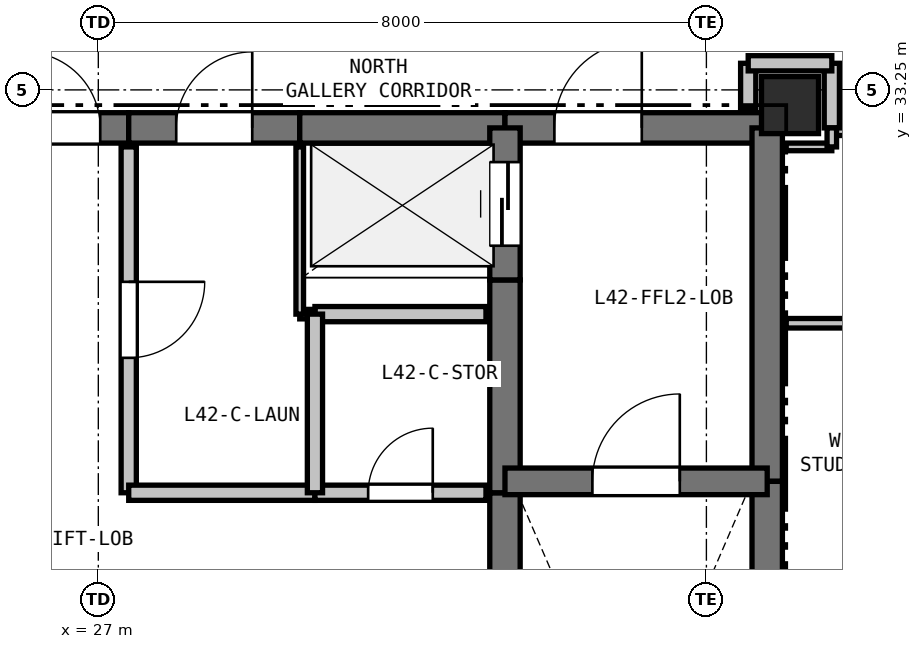
"""IFC4 building model, lengths in metres.
Left out: names, types, materials, properties, quantities, classifications, styles, units other than length and angle.
Written with IfcOpenShell. Run it as: python <this file> out.ifc"""

import sys

from ifc_helpers import new_model, si_unit, direction, frame, frame_2d, origin, origin_2d, place, context, subcontext, project, spatial, rectangle, extrude, element, fill, save


model = new_model("IFC4")
c1 = context("Model", 3, precision=1e-05, world=origin(), true_north=direction((0.0, 1.0)))
c2 = subcontext(c1, "Body", "Model", "MODEL_VIEW")
j1 = project(units=[si_unit("LENGTHUNIT", "METRE"), si_unit("PLANEANGLEUNIT", "RADIAN")], contexts=[c1])
p1 = place(None, origin())
s1 = spatial("IfcSite", under=j1, at=p1, CompositionType="ELEMENT")
p2 = place(p1, origin())
s2 = spatial("IfcBuilding", under=s1, at=p2, CompositionType="ELEMENT")
p3 = place(p2, frame((0.0, 0.0, 150.9)))
s3 = spatial("IfcBuildingStorey", under=s2, at=p3, CompositionType="ELEMENT", Elevation=150.9)
p4 = place(p3, frame((36.1, 33.05, 0.0), z_axis=(0.0, 0.0, 1.0), x_axis=(1.0, 0.0, 0.0)))
e1 = element("IfcColumn", 1, at=p4, inside=s3, PredefinedType="COLUMN", context=c2, shape_type="SweptSolid", body=[
    extrude(rectangle(XDim=0.75, YDim=0.75, at=origin_2d()), origin(), (0.0, 0.0, 1.0), 3.3),
])
p5 = place(p3, frame((25.65, 32.75, 0.0), z_axis=(0.0, 0.0, 1.0), x_axis=(1.0, 0.0, 0.0)))
e2 = element("IfcWall", 2, at=p5, inside=s3, PredefinedType="SHEAR", context=c2, shape_type="SweptSolid", body=[
    extrude(rectangle(XDim=1.75, YDim=0.4, at=frame_2d((0.875, 0.0))), origin(), (0.0, 0.0, 1.0), 3.06),
])
p6 = place(p5, frame((0.375, 0.0, 0.0)))
e3 = element("IfcOpeningElement", 3, at=p6, cuts=e2, PredefinedType="OPENING", context=c2, shape_type="SweptSolid", body=[
    extrude(rectangle(XDim=1.0, YDim=2.15, at=frame_2d((0.5, 1.075))), frame((0.0, 0.21, 0.0), z_axis=(0.0, -1.0, 0.0), x_axis=(1.0, 0.0, 0.0)), (0.0, 0.0, 1.0), 0.42),
])
p7 = place(p3, frame((27.4, 32.75, 0.0), z_axis=(0.0, 0.0, 1.0), x_axis=(1.0, 0.0, 0.0)))
e4 = element("IfcWall", 4, at=p7, inside=s3, PredefinedType="SHEAR", context=c2, shape_type="SweptSolid", body=[
    extrude(rectangle(XDim=2.25, YDim=0.4, at=frame_2d((1.125, 0.0))), origin(), (0.0, 0.0, 1.0), 3.06),
])
p8 = place(p7, frame((0.625, 0.0, 0.0)))
e5 = element("IfcOpeningElement", 5, at=p8, cuts=e4, PredefinedType="OPENING", context=c2, shape_type="SweptSolid", body=[
    extrude(rectangle(XDim=1.0, YDim=2.15, at=frame_2d((0.5, 1.075))), frame((0.0, 0.21, 0.0), z_axis=(0.0, -1.0, 0.0), x_axis=(1.0, 0.0, 0.0)), (0.0, 0.0, 1.0), 0.42),
])
p9 = place(p3, frame((29.65, 32.75, 0.0), z_axis=(0.0, 0.0, 1.0), x_axis=(1.0, 0.0, 0.0)))
e6 = element("IfcWall", 6, at=p9, inside=s3, PredefinedType="SHEAR", context=c2, shape_type="SweptSolid", body=[
    extrude(rectangle(XDim=2.7, YDim=0.4, at=frame_2d((1.35, 0.0))), origin(), (0.0, 0.0, 1.0), 3.06),
])
p10 = place(p3, frame((32.35, 32.75, 0.0), z_axis=(0.0, 0.0, 1.0), x_axis=(1.0, 0.0, 0.0)))
e7 = element("IfcWall", 7, at=p10, inside=s3, PredefinedType="SHEAR", context=c2, shape_type="SweptSolid", body=[
    extrude(rectangle(XDim=3.45, YDim=0.4, at=frame_2d((1.725, 0.0))), origin(), (0.0, 0.0, 1.0), 3.06),
])
p11 = place(p10, frame((0.65, 0.0, 0.0)))
e8 = element("IfcOpeningElement", 8, at=p11, cuts=e7, PredefinedType="OPENING", context=c2, shape_type="SweptSolid", body=[
    extrude(rectangle(XDim=1.15, YDim=2.15, at=frame_2d((0.575, 1.075))), frame((0.0, 0.21, 0.0), z_axis=(0.0, -1.0, 0.0), x_axis=(1.0, 0.0, 0.0)), (0.0, 0.0, 1.0), 0.42),
])
p12 = place(p3, frame((35.8, 32.75, 0.0), z_axis=(0.0, 0.0, 1.0), x_axis=(0.0, -1.0, 0.0)))
e9 = element("IfcWall", 9, at=p12, inside=s3, PredefinedType="SHEAR", context=c2, shape_type="SweptSolid", body=[
    extrude(rectangle(XDim=4.65, YDim=0.4, at=frame_2d((2.325, 0.0))), origin(), (0.0, 0.0, 1.0), 3.06),
])
p13 = place(p3, frame((35.8, 28.1, 0.0), z_axis=(0.0, 0.0, 1.0), x_axis=(0.0, -1.0, 0.0)))
e10 = element("IfcWall", 10, at=p13, inside=s3, PredefinedType="SHEAR", context=c2, shape_type="SweptSolid", body=[
    extrude(rectangle(XDim=7.35, YDim=0.4, at=frame_2d((3.675, 0.0))), origin(), (0.0, 0.0, 1.0), 3.06),
])
p14 = place(p3, frame((32.35, 25.55, 0.0), z_axis=(0.0, 0.0, 1.0), x_axis=(0.0, 1.0, 0.0)))
e11 = element("IfcWall", 11, at=p14, inside=s3, PredefinedType="SHEAR", context=c2, shape_type="SweptSolid", body=[
    extrude(rectangle(XDim=2.4, YDim=0.4, at=frame_2d((1.2, 0.0))), origin(), (0.0, 0.0, 1.0), 3.06),
])
p15 = place(p3, frame((32.35, 27.95, 0.0), z_axis=(0.0, 0.0, 1.0), x_axis=(0.0, 1.0, 0.0)))
e12 = element("IfcWall", 12, at=p15, inside=s3, PredefinedType="SHEAR", context=c2, shape_type="SweptSolid", body=[
    extrude(rectangle(XDim=2.8, YDim=0.4, at=frame_2d((1.4, 0.0))), origin(), (0.0, 0.0, 1.0), 3.06),
])
p16 = place(p3, frame((32.35, 30.75, 0.0), z_axis=(0.0, 0.0, 1.0), x_axis=(0.0, 1.0, 0.0)))
e13 = element("IfcWall", 13, at=p16, inside=s3, PredefinedType="SHEAR", context=c2, shape_type="SweptSolid", body=[
    extrude(rectangle(XDim=2.0, YDim=0.4, at=frame_2d((1.0, 0.0))), origin(), (0.0, 0.0, 1.0), 3.06),
])
p17 = place(p16, frame((0.45, 0.0, 0.0)))
e14 = element("IfcOpeningElement", 14, at=p17, cuts=e13, PredefinedType="OPENING", context=c2, shape_type="SweptSolid", body=[
    extrude(rectangle(XDim=1.1, YDim=2.15, at=frame_2d((0.55, 1.075))), frame((0.0, 0.21, 0.0), z_axis=(0.0, -1.0, 0.0), x_axis=(1.0, 0.0, 0.0)), (0.0, 0.0, 1.0), 0.42),
])
p18 = place(p3, frame((32.35, 28.1, 0.0), z_axis=(0.0, 0.0, 1.0), x_axis=(1.0, 0.0, 0.0)))
e15 = element("IfcWall", 15, at=p18, inside=s3, PredefinedType="SHEAR", context=c2, shape_type="SweptSolid", body=[
    extrude(rectangle(XDim=3.45, YDim=0.35, at=frame_2d((1.725, 0.0))), origin(), (0.0, 0.0, 1.0), 3.06),
])
p19 = place(p18, frame((1.15, 0.0, 0.0)))
e16 = element("IfcOpeningElement", 16, at=p19, cuts=e15, PredefinedType="OPENING", context=c2, shape_type="SweptSolid", body=[
    extrude(rectangle(XDim=1.15, YDim=2.15, at=frame_2d((0.575, 1.075))), frame((0.0, 0.185, 0.0), z_axis=(0.0, -1.0, 0.0), x_axis=(1.0, 0.0, 0.0)), (0.0, 0.0, 1.0), 0.37),
])
p20 = place(p3, frame((32.1, 30.3, 0.0), z_axis=(0.0, 0.0, 1.0), x_axis=(-1.0, 0.0, 0.0)))
e17 = element("IfcWall", 17, at=p20, inside=s3, PredefinedType="PARTITIONING", context=c2, shape_type="SweptSolid", body=[
    extrude(rectangle(XDim=2.25, YDim=0.2, at=frame_2d((1.125, 0.0))), origin(), (0.0, 0.0, 1.0), 3.06),
])
p21 = place(p3, frame((29.85, 30.3, 0.0), z_axis=(0.0, 0.0, 1.0), x_axis=(-1.0, 0.0, 0.0)))
e18 = element("IfcWall", 18, at=p21, inside=s3, PredefinedType="PARTITIONING", context=c2, shape_type="SweptSolid", body=[
    extrude(rectangle(XDim=0.2, YDim=0.125, at=frame_2d((0.1, 0.0))), origin(), (0.0, 0.0, 1.0), 3.06),
])
p22 = place(p3, frame((29.65, 30.3, 0.0), z_axis=(0.0, 0.0, 1.0), x_axis=(0.0, 1.0, 0.0)))
e19 = element("IfcWall", 19, at=p22, inside=s3, PredefinedType="PARTITIONING", context=c2, shape_type="SweptSolid", body=[
    extrude(rectangle(XDim=2.2, YDim=0.1, at=frame_2d((1.1, 0.0))), origin(), (0.0, 0.0, 1.0), 3.06),
])
p23 = place(p3, frame((27.4, 32.5, 0.0), z_axis=(0.0, 0.0, 1.0), x_axis=(0.0, -1.0, 0.0)))
e20 = element("IfcWall", 20, at=p23, inside=s3, PredefinedType="PARTITIONING", context=c2, shape_type="SweptSolid", body=[
    extrude(rectangle(XDim=4.55, YDim=0.2, at=frame_2d((2.275, 0.0))), origin(), (0.0, 0.0, 1.0), 3.06),
])
p24 = place(p23, frame((1.775, 0.0, 0.0)))
e21 = element("IfcOpeningElement", 21, at=p24, cuts=e20, PredefinedType="OPENING", context=c2, shape_type="SweptSolid", body=[
    extrude(rectangle(XDim=1.0, YDim=2.15, at=frame_2d((0.5, 1.075))), frame((0.0, 0.11, 0.0), z_axis=(0.0, -1.0, 0.0), x_axis=(1.0, 0.0, 0.0)), (0.0, 0.0, 1.0), 0.22),
])
p25 = place(p3, frame((27.4, 27.95, 0.0), z_axis=(0.0, 0.0, 1.0), x_axis=(1.0, 0.0, 0.0)))
e22 = element("IfcWall", 22, at=p25, inside=s3, PredefinedType="PARTITIONING", context=c2, shape_type="SweptSolid", body=[
    extrude(rectangle(XDim=2.45, YDim=0.2, at=frame_2d((1.225, 0.0))), origin(), (0.0, 0.0, 1.0), 3.06),
])
p26 = place(p3, frame((29.85, 27.95, 0.0), z_axis=(0.0, 0.0, 1.0), x_axis=(1.0, 0.0, 0.0)))
e23 = element("IfcWall", 23, at=p26, inside=s3, PredefinedType="PARTITIONING", context=c2, shape_type="SweptSolid", body=[
    extrude(rectangle(XDim=2.25, YDim=0.2, at=frame_2d((1.125, 0.0))), origin(), (0.0, 0.0, 1.0), 3.06),
])
p27 = place(p26, frame((0.7, 0.0, 0.0)))
e24 = element("IfcOpeningElement", 24, at=p27, cuts=e23, PredefinedType="OPENING", context=c2, shape_type="SweptSolid", body=[
    extrude(rectangle(XDim=0.85, YDim=2.1, at=frame_2d((0.425, 1.05))), frame((0.0, 0.11, 0.0), z_axis=(0.0, -1.0, 0.0), x_axis=(1.0, 0.0, 0.0)), (0.0, 0.0, 1.0), 0.22),
])
p28 = place(p3, frame((35.55, 33.6, 0.0), z_axis=(0.0, 0.0, 1.0), x_axis=(0.0, -1.0, 0.0)))
e25 = element("IfcWall", 25, at=p28, inside=s3, PredefinedType="PARTITIONING", context=c2, shape_type="SweptSolid", body=[
    extrude(rectangle(XDim=0.6, YDim=0.2, at=frame_2d((0.3, 0.0))), origin(), (0.0, 0.0, 1.0), 2.585),
])
p29 = place(p3, frame((39.2, 32.75, 0.0), z_axis=(0.0, 0.0, 1.0), x_axis=(-1.0, 0.0, 0.0)))
e26 = element("IfcWall", 26, at=p29, inside=s3, PredefinedType="PARTITIONING", context=c2, shape_type="SweptSolid", body=[
    extrude(rectangle(XDim=2.55, YDim=0.2, at=frame_2d((1.275, 0.0))), origin(), (0.0, 0.0, 1.0), 3.06),
])
p30 = place(p29, frame((0.775, 0.0, 0.0)))
e27 = element("IfcOpeningElement", 27, at=p30, cuts=e26, PredefinedType="OPENING", context=c2, shape_type="SweptSolid", body=[
    extrude(rectangle(XDim=1.0, YDim=2.15, at=frame_2d((0.5, 1.075))), frame((0.0, 0.11, 0.0), z_axis=(0.0, -1.0, 0.0), x_axis=(1.0, 0.0, 0.0)), (0.0, 0.0, 1.0), 0.22),
])
p31 = place(p3, frame((36.65, 32.75, 0.0), z_axis=(0.0, 0.0, 1.0), x_axis=(0.0, 1.0, 0.0)))
e28 = element("IfcWall", 28, at=p31, inside=s3, PredefinedType="PARTITIONING", context=c2, shape_type="SweptSolid", body=[
    extrude(rectangle(XDim=0.85, YDim=0.2, at=frame_2d((0.425, 0.0))), origin(), (0.0, 0.0, 1.0), 2.433),
])
p32 = place(p3, frame((36.65, 33.6, 0.0), z_axis=(0.0, 0.0, 1.0), x_axis=(-1.0, 0.0, 0.0)))
e29 = element("IfcWall", 29, at=p32, inside=s3, PredefinedType="PARTITIONING", context=c2, shape_type="SweptSolid", body=[
    extrude(rectangle(XDim=1.1, YDim=0.2, at=frame_2d((0.55, 0.0))), origin(), (0.0, 0.0, 1.0), 2.433),
])
p33 = place(p3, frame((29.85, 30.3, 0.0), z_axis=(0.0, 0.0, 1.0), x_axis=(0.0, -1.0, 0.0)))
e30 = element("IfcWall", 30, at=p33, inside=s3, PredefinedType="PARTITIONING", context=c2, shape_type="SweptSolid", body=[
    extrude(rectangle(XDim=2.35, YDim=0.2, at=frame_2d((1.175, 0.0))), origin(), (0.0, 0.0, 1.0), 3.06),
])
p34 = place(p3, frame((36.05, 30.18, 0.0), z_axis=(0.0, 0.0, 1.0), x_axis=(1.0, 0.0, 0.0)))
e31 = element("IfcWall", 31, at=p34, inside=s3, PredefinedType="PARTITIONING", context=c2, shape_type="SweptSolid", body=[
    extrude(rectangle(XDim=6.131, YDim=0.125, at=frame_2d((3.065, 0.0))), origin(), (0.0, 0.0, 1.0), 2.365),
])
p35 = place(p3, frame((36.05, 32.5, 0.0), z_axis=(0.0, 0.0, 1.0), x_axis=(1.0, 0.0, 0.0)))
e32 = element("IfcWall", 32, at=p35, inside=s3, PredefinedType="PARTITIONING", context=c2, shape_type="SweptSolid", body=[
    extrude(rectangle(XDim=0.6, YDim=0.1, at=frame_2d((0.3, 0.0))), origin(), (0.0, 0.0, 1.0), 2.585),
])
p36 = place(p3, frame((36.65, 32.5, 0.0), z_axis=(0.0, 0.0, 1.0), x_axis=(0.0, 1.0, 0.0)))
e33 = element("IfcWall", 33, at=p36, inside=s3, PredefinedType="PARTITIONING", context=c2, shape_type="SweptSolid", body=[
    extrude(rectangle(XDim=0.25, YDim=0.125, at=frame_2d((0.125, 0.0))), origin(), (0.0, 0.0, 1.0), 3.06),
])
p37 = place(p6, origin())
e34 = element("IfcDoor", 34, at=p37, inside=s3, OperationType="SINGLE_SWING_LEFT", PredefinedType="DOOR", context=c2, shape_type="SweptSolid", body=[
    extrude(rectangle(XDim=1.0, YDim=2.15, at=frame_2d((0.5, 1.075))), frame((0.0, 0.025, 0.0), z_axis=(0.0, -1.0, 0.0), x_axis=(1.0, 0.0, 0.0)), (0.0, 0.0, 1.0), 0.05),
])
fill(e3, e34)
p38 = place(p17, origin())
e35 = element("IfcDoor", 35, at=p38, inside=s3, OperationType="SLIDING_TO_LEFT", PredefinedType="DOOR", context=c2, shape_type="SweptSolid", body=[
    extrude(rectangle(XDim=1.1, YDim=2.15, at=frame_2d((0.55, 1.075))), frame((0.0, 0.025, 0.0), z_axis=(0.0, -1.0, 0.0), x_axis=(1.0, 0.0, 0.0)), (0.0, 0.0, 1.0), 0.05),
])
fill(e14, e35)
p39 = place(p19, origin())
e36 = element("IfcDoor", 36, at=p39, inside=s3, OperationType="SINGLE_SWING_RIGHT", PredefinedType="DOOR", context=c2, shape_type="SweptSolid", body=[
    extrude(rectangle(XDim=1.15, YDim=2.15, at=frame_2d((0.575, 1.075))), frame((0.0, 0.025, 0.0), z_axis=(0.0, -1.0, 0.0), x_axis=(1.0, 0.0, 0.0)), (0.0, 0.0, 1.0), 0.05),
])
fill(e16, e36)
p40 = place(p11, origin())
e37 = element("IfcDoor", 37, at=p40, inside=s3, OperationType="SINGLE_SWING_RIGHT", PredefinedType="DOOR", context=c2, shape_type="SweptSolid", body=[
    extrude(rectangle(XDim=1.15, YDim=2.15, at=frame_2d((0.575, 1.075))), frame((0.0, 0.025, 0.0), z_axis=(0.0, -1.0, 0.0), x_axis=(1.0, 0.0, 0.0)), (0.0, 0.0, 1.0), 0.05),
])
fill(e8, e37)
p41 = place(p24, origin())
e38 = element("IfcDoor", 38, at=p41, inside=s3, OperationType="SINGLE_SWING_LEFT", PredefinedType="DOOR", context=c2, shape_type="SweptSolid", body=[
    extrude(rectangle(XDim=1.0, YDim=2.15, at=frame_2d((0.5, 1.075))), frame((0.0, 0.025, 0.0), z_axis=(0.0, -1.0, 0.0), x_axis=(1.0, 0.0, 0.0)), (0.0, 0.0, 1.0), 0.05),
])
fill(e21, e38)
p42 = place(p27, origin())
e39 = element("IfcDoor", 39, at=p42, inside=s3, OperationType="SINGLE_SWING_RIGHT", PredefinedType="DOOR", context=c2, shape_type="SweptSolid", body=[
    extrude(rectangle(XDim=0.85, YDim=2.1, at=frame_2d((0.425, 1.05))), frame((0.0, 0.025, 0.0), z_axis=(0.0, -1.0, 0.0), x_axis=(1.0, 0.0, 0.0)), (0.0, 0.0, 1.0), 0.05),
])
fill(e24, e39)
p43 = place(p8, origin())
e40 = element("IfcDoor", 40, at=p43, inside=s3, OperationType="SINGLE_SWING_RIGHT", PredefinedType="DOOR", context=c2, shape_type="SweptSolid", body=[
    extrude(rectangle(XDim=1.0, YDim=2.15, at=frame_2d((0.5, 1.075))), frame((0.0, 0.025, 0.0), z_axis=(0.0, -1.0, 0.0), x_axis=(1.0, 0.0, 0.0)), (0.0, 0.0, 1.0), 0.05),
])
fill(e5, e40)
save(model, sys.argv[1])
